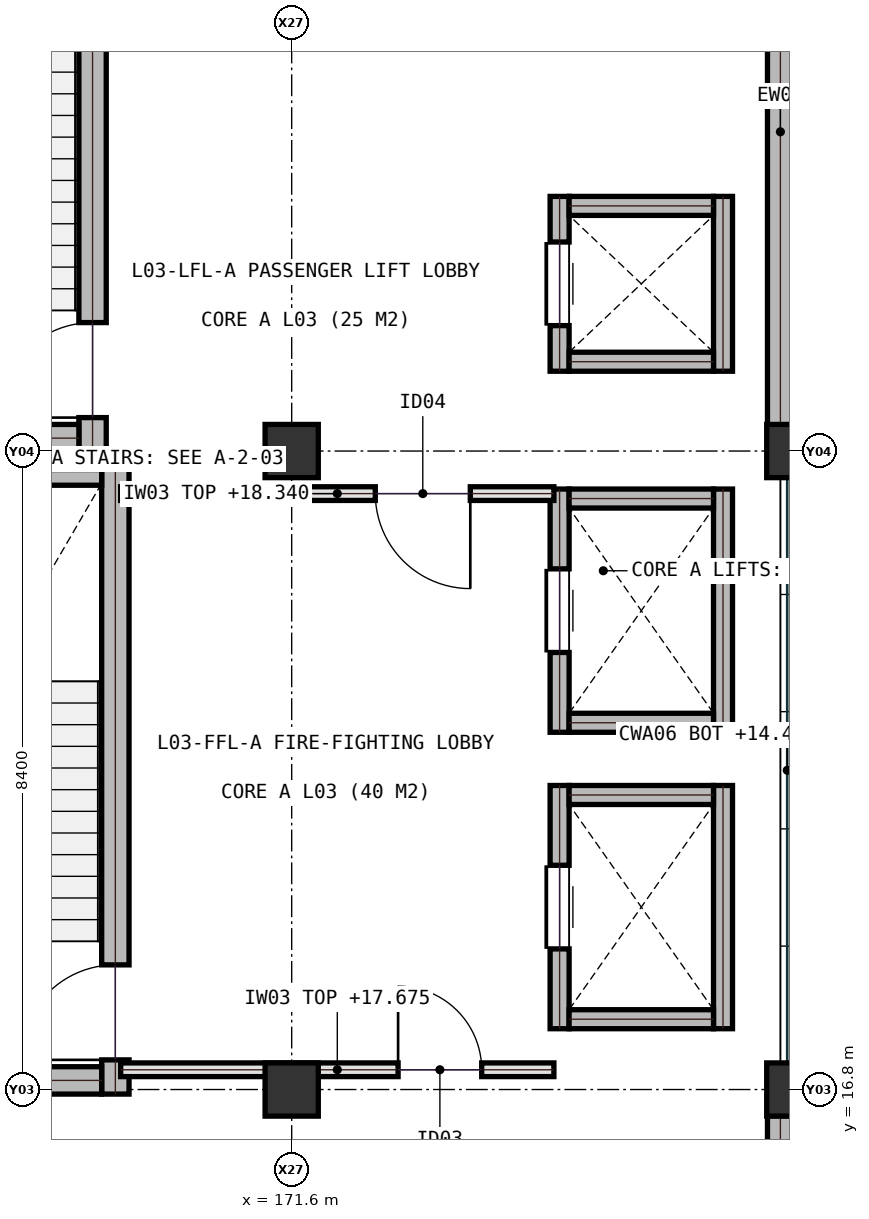
"""IFC4 building model, lengths in metres.
Left out: names, types, materials, properties, quantities, classifications, styles, units other than length and angle.
Written with IfcOpenShell. Run it as: python <this file> out.ifc"""

import sys

from ifc_helpers import new_model, si_unit, direction, frame, frame_2d, origin, origin_2d, place, context, subcontext, project, spatial, rectangle, extrude, element, fill, save


model = new_model("IFC4")
c1 = context("Model", 3, precision=1e-05, world=origin(), true_north=direction((0.0, 1.0)))
c2 = subcontext(c1, "Body", "Model", "MODEL_VIEW")
j1 = project(units=[si_unit("LENGTHUNIT", "METRE"), si_unit("PLANEANGLEUNIT", "RADIAN")], contexts=[c1])
p1 = place(None, origin())
s1 = spatial("IfcSite", under=j1, at=p1, CompositionType="ELEMENT")
p2 = place(p1, origin())
s2 = spatial("IfcBuilding", under=s1, at=p2, CompositionType="ELEMENT")
p3 = place(p2, frame((0.0, 0.0, 14.4)))
s3 = spatial("IfcBuildingStorey", under=s2, at=p3, CompositionType="ELEMENT", Elevation=14.4)
for number, where, z_axis, x_axis in (
    (1, (171.6, 16.8, 0.0), (0.0, 0.0, 1.0), (1.0, 0.0, 0.0)),
    (2, (171.6, 25.2, 0.0), (0.0, 0.0, 1.0), (1.0, 0.0, 0.0)),
    (3, (178.2, 16.8, 0.0), (0.0, 0.0, 1.0), (1.0, 0.0, 0.0)),
    (4, (178.2, 25.2, 0.0), (0.0, 0.0, 1.0), (1.0, 0.0, 0.0)),
):
    element("IfcColumn", number, at=place(p3, frame(where, z_axis=z_axis, x_axis=x_axis)), inside=s3, PredefinedType="COLUMN", context=c2, shape_type="SweptSolid", body=[
        extrude(rectangle(XDim=0.7, YDim=0.7, at=origin_2d()), origin(), (0.0, 0.0, 1.0), 4.2),
    ])
for number, where, z_axis, x_axis in (
    (5, (178.03, 8.745, 0.0), (0.0, 0.0, 1.0), (0.0, 1.0, 0.0)),
    (6, (178.03, 25.545, 0.0), (0.0, 0.0, 1.0), (0.0, 1.0, 0.0)),
):
    element("IfcWall", number, at=place(p3, frame(where, z_axis=z_axis, x_axis=x_axis)), inside=s3, PredefinedType="SHEAR", context=c2, shape_type="SweptSolid", body=[
        extrude(rectangle(XDim=7.71, YDim=0.34, at=frame_2d((3.855, 0.0))), origin(), (0.0, 0.0, 1.0), 3.94),
    ])
p4 = place(p3, frame((169.28, 16.74, 0.0), z_axis=(0.0, 0.0, 1.0), x_axis=(0.0, 1.0, 0.0)))
e7 = element("IfcWall", 7, at=p4, inside=s3, PredefinedType="SHEAR", context=c2, shape_type="SweptSolid", body=[
    extrude(rectangle(XDim=8.37, YDim=0.36, at=frame_2d((4.185, 0.0))), origin(), (0.0, 0.0, 1.0), 3.94),
])
p5 = place(p4, frame((0.45, 0.0, 0.0)))
e8 = element("IfcOpeningElement", 8, at=p5, cuts=e7, PredefinedType="OPENING", context=c2, shape_type="SweptSolid", body=[
    extrude(rectangle(XDim=1.25, YDim=2.15, at=frame_2d((0.625, 1.075))), frame((0.0, 0.19, 0.0), z_axis=(0.0, -1.0, 0.0), x_axis=(1.0, 0.0, 0.0)), (0.0, 0.0, 1.0), 0.38),
])
for number, where, z_axis, x_axis in (
    (9, (165.6, 24.93, 0.0), (0.0, 0.0, 1.0), (1.0, 0.0, 0.0)),
    (10, (165.6, 16.92, 0.0), (0.0, 0.0, 1.0), (1.0, 0.0, 0.0)),
):
    element("IfcWall", number, at=place(p3, frame(where, z_axis=z_axis, x_axis=x_axis)), inside=s3, PredefinedType="SHEAR", context=c2, shape_type="SweptSolid", body=[
        extrude(rectangle(XDim=3.5, YDim=0.36, at=frame_2d((1.75, 0.0))), origin(), (0.0, 0.0, 1.0), 3.94),
    ])
p6 = place(p3, frame((168.98, 25.19, 0.0), z_axis=(0.0, 0.0, 1.0), x_axis=(0.0, 1.0, 0.0)))
e11 = element("IfcWall", 11, at=p6, inside=s3, PredefinedType="SHEAR", context=c2, shape_type="SweptSolid", body=[
    extrude(rectangle(XDim=8.17, YDim=0.36, at=frame_2d((4.085, 0.0))), origin(), (0.0, 0.0, 1.0), 3.94),
])
p7 = place(p6, frame((0.45, 0.0, 0.0)))
e12 = element("IfcOpeningElement", 12, at=p7, cuts=e11, PredefinedType="OPENING", context=c2, shape_type="SweptSolid", body=[
    extrude(rectangle(XDim=1.25, YDim=2.15, at=frame_2d((0.625, 1.075))), frame((0.0, 0.19, 0.0), z_axis=(0.0, -1.0, 0.0), x_axis=(1.0, 0.0, 0.0)), (0.0, 0.0, 1.0), 0.38),
])
p8 = place(p3, frame((165.6, 25.37, 0.0), z_axis=(0.0, 0.0, 1.0), x_axis=(1.0, 0.0, 0.0)))
e13 = element("IfcWall", 13, at=p8, inside=s3, PredefinedType="SHEAR", context=c2, shape_type="SweptSolid", body=[
    extrude(rectangle(XDim=3.2, YDim=0.36, at=frame_2d((1.6, 0.0))), origin(), (0.0, 0.0, 1.0), 3.94),
])
p9 = place(p3, frame((175.125, 17.6, 0.0), z_axis=(0.0, 0.0, 1.0), x_axis=(0.0, 1.0, 0.0)))
e14 = element("IfcWall", 14, at=p9, inside=s3, PredefinedType="SHEAR", context=c2, shape_type="SweptSolid", body=[
    extrude(rectangle(XDim=3.2, YDim=0.25, at=frame_2d((1.6, 0.0))), origin(), (0.0, 0.0, 1.0), 3.94),
])
p10 = place(p9, frame((1.05, 0.0, 0.0)))
e15 = element("IfcOpeningElement", 15, at=p10, cuts=e14, PredefinedType="OPENING", context=c2, shape_type="SweptSolid", body=[
    extrude(rectangle(XDim=1.1, YDim=2.15, at=frame_2d((0.55, 1.075))), frame((0.0, 0.135, 0.0), z_axis=(0.0, -1.0, 0.0), x_axis=(1.0, 0.0, 0.0)), (0.0, 0.0, 1.0), 0.27),
])
p11 = place(p3, frame((177.275, 17.6, 0.0), z_axis=(0.0, 0.0, 1.0), x_axis=(0.0, 1.0, 0.0)))
e16 = element("IfcWall", 16, at=p11, inside=s3, PredefinedType="SHEAR", context=c2, shape_type="SweptSolid", body=[
    extrude(rectangle(XDim=3.2, YDim=0.25, at=frame_2d((1.6, 0.0))), origin(), (0.0, 0.0, 1.0), 3.94),
])
for number, where, z_axis, x_axis in (
    (17, (175.25, 17.725, 0.0), (0.0, 0.0, 1.0), (1.0, 0.0, 0.0)),
    (18, (175.25, 20.675, 0.0), (0.0, 0.0, 1.0), (1.0, 0.0, 0.0)),
):
    element("IfcWall", number, at=place(p3, frame(where, z_axis=z_axis, x_axis=x_axis)), inside=s3, PredefinedType="SHEAR", context=c2, shape_type="SweptSolid", body=[
        extrude(rectangle(XDim=1.9, YDim=0.25, at=frame_2d((0.95, 0.0))), origin(), (0.0, 0.0, 1.0), 3.94),
    ])
p12 = place(p3, frame((175.125, 21.5, 0.0), z_axis=(0.0, 0.0, 1.0), x_axis=(0.0, 1.0, 0.0)))
e19 = element("IfcWall", 19, at=p12, inside=s3, PredefinedType="SHEAR", context=c2, shape_type="SweptSolid", body=[
    extrude(rectangle(XDim=3.2, YDim=0.25, at=frame_2d((1.6, 0.0))), origin(), (0.0, 0.0, 1.0), 3.94),
])
p13 = place(p12, frame((1.05, 0.0, 0.0)))
e20 = element("IfcOpeningElement", 20, at=p13, cuts=e19, PredefinedType="OPENING", context=c2, shape_type="SweptSolid", body=[
    extrude(rectangle(XDim=1.1, YDim=2.15, at=frame_2d((0.55, 1.075))), frame((0.0, 0.135, 0.0), z_axis=(0.0, -1.0, 0.0), x_axis=(1.0, 0.0, 0.0)), (0.0, 0.0, 1.0), 0.27),
])
p14 = place(p3, frame((177.275, 21.5, 0.0), z_axis=(0.0, 0.0, 1.0), x_axis=(0.0, 1.0, 0.0)))
e21 = element("IfcWall", 21, at=p14, inside=s3, PredefinedType="SHEAR", context=c2, shape_type="SweptSolid", body=[
    extrude(rectangle(XDim=3.2, YDim=0.25, at=frame_2d((1.6, 0.0))), origin(), (0.0, 0.0, 1.0), 3.94),
])
for number, where, z_axis, x_axis in (
    (22, (175.25, 21.625, 0.0), (0.0, 0.0, 1.0), (1.0, 0.0, 0.0)),
    (23, (175.25, 24.575, 0.0), (0.0, 0.0, 1.0), (1.0, 0.0, 0.0)),
):
    element("IfcWall", number, at=place(p3, frame(where, z_axis=z_axis, x_axis=x_axis)), inside=s3, PredefinedType="SHEAR", context=c2, shape_type="SweptSolid", body=[
        extrude(rectangle(XDim=1.9, YDim=0.25, at=frame_2d((0.95, 0.0))), origin(), (0.0, 0.0, 1.0), 3.94),
    ])
p15 = place(p3, frame((175.125, 26.25, 0.0), z_axis=(0.0, 0.0, 1.0), x_axis=(0.0, 1.0, 0.0)))
e24 = element("IfcWall", 24, at=p15, inside=s3, PredefinedType="SHEAR", context=c2, shape_type="SweptSolid", body=[
    extrude(rectangle(XDim=2.3, YDim=0.25, at=frame_2d((1.15, 0.0))), origin(), (0.0, 0.0, 1.0), 3.94),
])
p16 = place(p15, frame((0.6, 0.0, 0.0)))
e25 = element("IfcOpeningElement", 25, at=p16, cuts=e24, PredefinedType="OPENING", context=c2, shape_type="SweptSolid", body=[
    extrude(rectangle(XDim=1.1, YDim=2.15, at=frame_2d((0.55, 1.075))), frame((0.0, 0.135, 0.0), z_axis=(0.0, -1.0, 0.0), x_axis=(1.0, 0.0, 0.0)), (0.0, 0.0, 1.0), 0.27),
])
p17 = place(p3, frame((177.275, 26.25, 0.0), z_axis=(0.0, 0.0, 1.0), x_axis=(0.0, 1.0, 0.0)))
e26 = element("IfcWall", 26, at=p17, inside=s3, PredefinedType="SHEAR", context=c2, shape_type="SweptSolid", body=[
    extrude(rectangle(XDim=2.3, YDim=0.25, at=frame_2d((1.15, 0.0))), origin(), (0.0, 0.0, 1.0), 3.94),
])
for number, where, z_axis, x_axis in (
    (27, (175.25, 26.375, 0.0), (0.0, 0.0, 1.0), (1.0, 0.0, 0.0)),
    (28, (175.25, 28.425, 0.0), (0.0, 0.0, 1.0), (1.0, 0.0, 0.0)),
):
    element("IfcWall", number, at=place(p3, frame(where, z_axis=z_axis, x_axis=x_axis)), inside=s3, PredefinedType="SHEAR", context=c2, shape_type="SweptSolid", body=[
        extrude(rectangle(XDim=1.9, YDim=0.25, at=frame_2d((0.95, 0.0))), origin(), (0.0, 0.0, 1.0), 3.94),
    ])
p18 = place(p3, frame((169.35, 24.64, 0.0), z_axis=(0.0, 0.0, 1.0), x_axis=(1.0, 0.0, 0.0)))
e29 = element("IfcWall", 29, at=p18, inside=s3, PredefinedType="SOLIDWALL", context=c2, shape_type="SweptSolid", body=[
    extrude(rectangle(XDim=5.7, YDim=0.18, at=frame_2d((2.85, 0.0))), origin(), (0.0, 0.0, 1.0), 3.94),
])
p19 = place(p18, frame((3.35, 0.0, 0.0)))
e30 = element("IfcOpeningElement", 30, at=p19, cuts=e29, PredefinedType="OPENING", context=c2, shape_type="SweptSolid", body=[
    extrude(rectangle(XDim=1.25, YDim=2.15, at=frame_2d((0.625, 1.075))), frame((0.0, 0.1, 0.0), z_axis=(0.0, -1.0, 0.0), x_axis=(1.0, 0.0, 0.0)), (0.0, 0.0, 1.0), 0.2),
])
p20 = place(p3, frame((169.35, 17.06, 0.0), z_axis=(0.0, 0.0, 1.0), x_axis=(1.0, 0.0, 0.0)))
e31 = element("IfcWall", 31, at=p20, inside=s3, PredefinedType="SOLIDWALL", context=c2, shape_type="SweptSolid", body=[
    extrude(rectangle(XDim=5.7, YDim=0.18, at=frame_2d((2.85, 0.0))), origin(), (0.0, 0.0, 1.0), 3.275),
])
p21 = place(p20, frame((3.65, 0.0, 0.0)))
e32 = element("IfcOpeningElement", 32, at=p21, cuts=e31, PredefinedType="OPENING", context=c2, shape_type="SweptSolid", body=[
    extrude(rectangle(XDim=1.1, YDim=2.15, at=frame_2d((0.55, 1.075))), frame((0.0, 0.1, 0.0), z_axis=(0.0, -1.0, 0.0), x_axis=(1.0, 0.0, 0.0)), (0.0, 0.0, 1.0), 0.2),
])
p22 = place(p5, origin())
e33 = element("IfcDoor", 33, at=p22, inside=s3, OperationType="SINGLE_SWING_LEFT", PredefinedType="DOOR", context=c2, shape_type="SweptSolid", body=[
    extrude(rectangle(XDim=1.25, YDim=2.15, at=frame_2d((0.625, 1.075))), frame((0.0, 0.025, 0.0), z_axis=(0.0, -1.0, 0.0), x_axis=(1.0, 0.0, 0.0)), (0.0, 0.0, 1.0), 0.05),
])
fill(e8, e33)
p23 = place(p7, origin())
e34 = element("IfcDoor", 34, at=p23, inside=s3, OperationType="SINGLE_SWING_LEFT", PredefinedType="DOOR", context=c2, shape_type="SweptSolid", body=[
    extrude(rectangle(XDim=1.25, YDim=2.15, at=frame_2d((0.625, 1.075))), frame((0.0, 0.025, 0.0), z_axis=(0.0, -1.0, 0.0), x_axis=(1.0, 0.0, 0.0)), (0.0, 0.0, 1.0), 0.05),
])
fill(e12, e34)
p24 = place(p10, origin())
e35 = element("IfcDoor", 35, at=p24, inside=s3, OperationType="SLIDING_TO_LEFT", PredefinedType="DOOR", context=c2, shape_type="SweptSolid", body=[
    extrude(rectangle(XDim=1.1, YDim=2.15, at=frame_2d((0.55, 1.075))), frame((0.0, 0.025, 0.0), z_axis=(0.0, -1.0, 0.0), x_axis=(1.0, 0.0, 0.0)), (0.0, 0.0, 1.0), 0.05),
])
fill(e15, e35)
p25 = place(p13, origin())
e36 = element("IfcDoor", 36, at=p25, inside=s3, OperationType="SLIDING_TO_LEFT", PredefinedType="DOOR", context=c2, shape_type="SweptSolid", body=[
    extrude(rectangle(XDim=1.1, YDim=2.15, at=frame_2d((0.55, 1.075))), frame((0.0, 0.025, 0.0), z_axis=(0.0, -1.0, 0.0), x_axis=(1.0, 0.0, 0.0)), (0.0, 0.0, 1.0), 0.05),
])
fill(e20, e36)
p26 = place(p16, origin())
e37 = element("IfcDoor", 37, at=p26, inside=s3, OperationType="SLIDING_TO_LEFT", PredefinedType="DOOR", context=c2, shape_type="SweptSolid", body=[
    extrude(rectangle(XDim=1.1, YDim=2.15, at=frame_2d((0.55, 1.075))), frame((0.0, 0.025, 0.0), z_axis=(0.0, -1.0, 0.0), x_axis=(1.0, 0.0, 0.0)), (0.0, 0.0, 1.0), 0.05),
])
fill(e25, e37)
p27 = place(p19, frame((1.25, 0.0, 0.0), z_axis=(0.0, 0.0, 1.0), x_axis=(-1.0, 0.0, 0.0)))
e38 = element("IfcDoor", 38, at=p27, inside=s3, OperationType="SINGLE_SWING_RIGHT", PredefinedType="DOOR", context=c2, shape_type="SweptSolid", body=[
    extrude(rectangle(XDim=1.25, YDim=2.15, at=frame_2d((0.625, 1.075))), frame((0.0, 0.025, 0.0), z_axis=(0.0, -1.0, 0.0), x_axis=(1.0, 0.0, 0.0)), (0.0, 0.0, 1.0), 0.05),
])
fill(e30, e38)
p28 = place(p21, origin())
e39 = element("IfcDoor", 39, at=p28, inside=s3, OperationType="SINGLE_SWING_LEFT", PredefinedType="DOOR", context=c2, shape_type="SweptSolid", body=[
    extrude(rectangle(XDim=1.1, YDim=2.15, at=frame_2d((0.55, 1.075))), frame((0.0, 0.025, 0.0), z_axis=(0.0, -1.0, 0.0), x_axis=(1.0, 0.0, 0.0)), (0.0, 0.0, 1.0), 0.05),
])
fill(e32, e39)
save(model, sys.argv[1])
